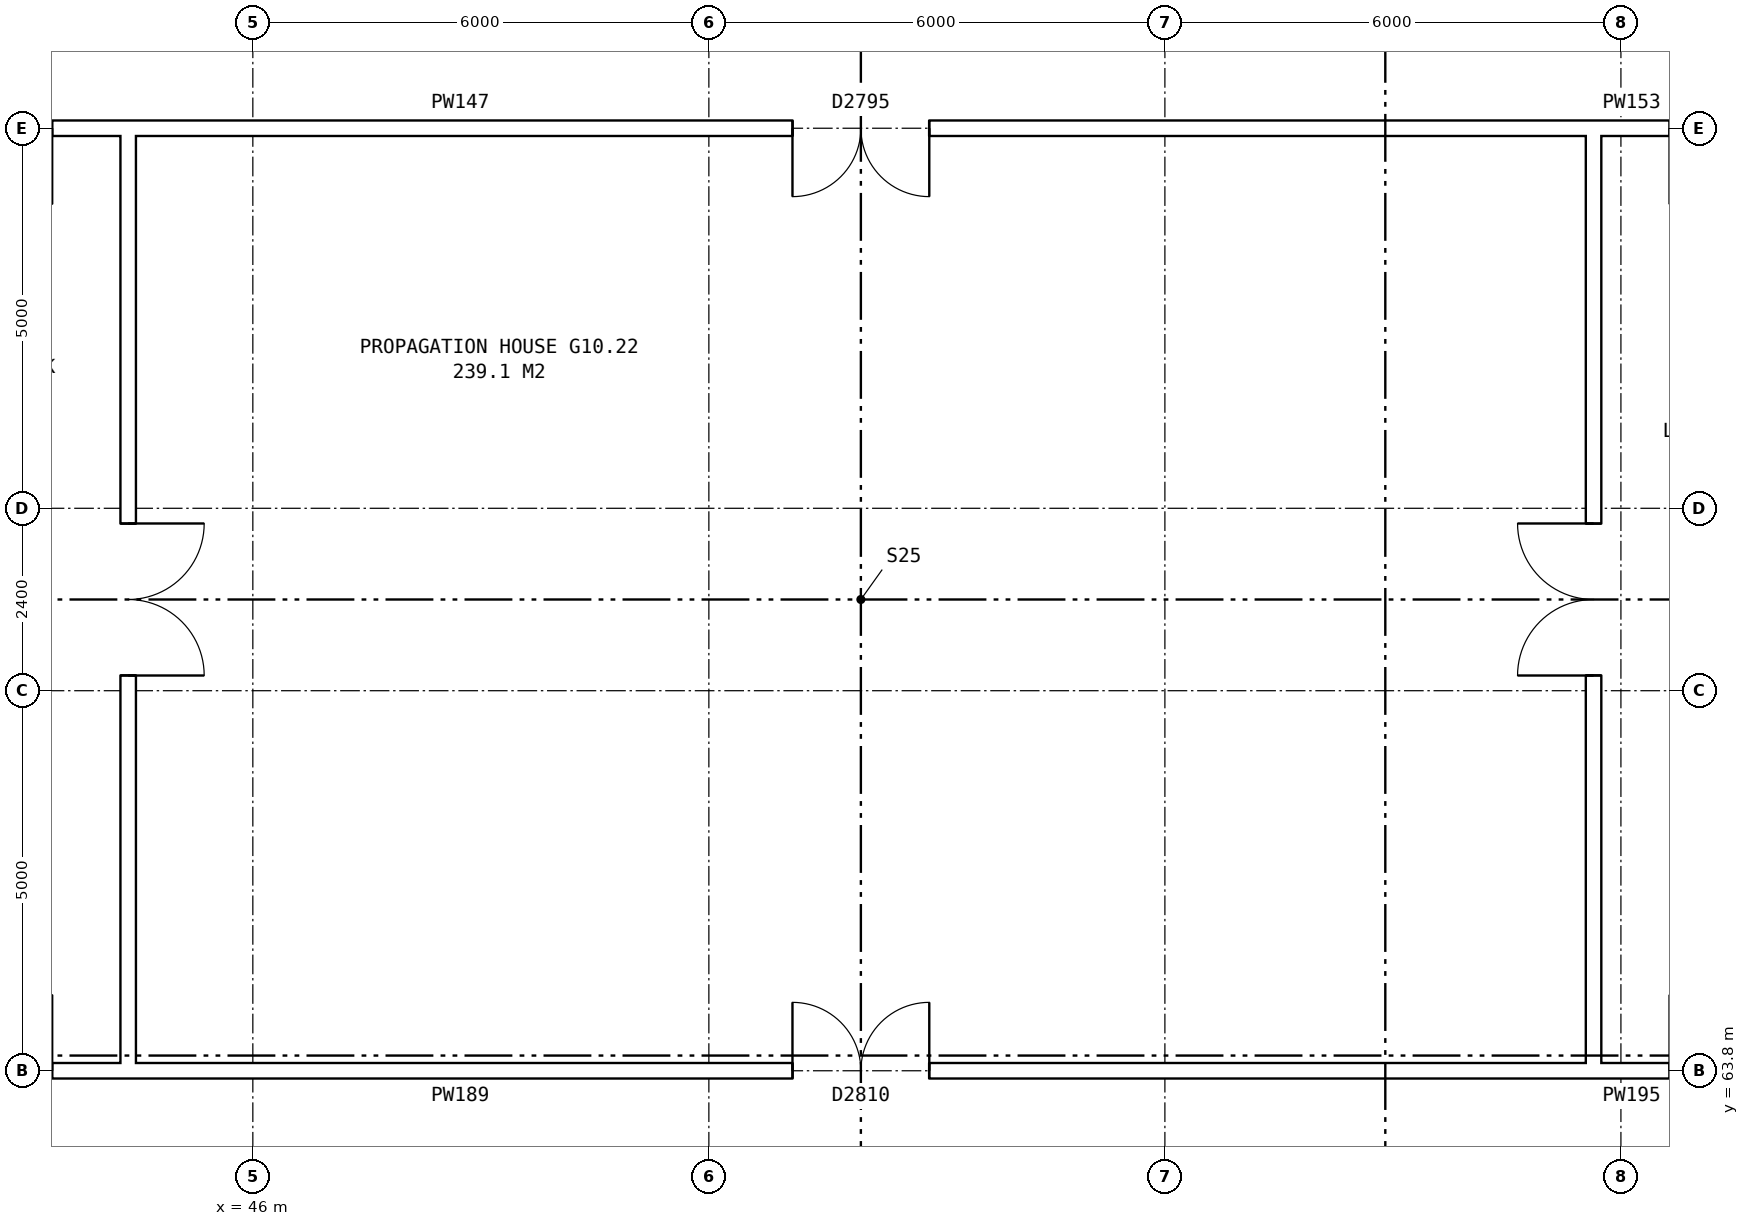
"""IFC4 building model, lengths in metres.
Left out: names, types, materials, properties, quantities, classifications, styles, units other than length and angle.
Written with IfcOpenShell. Run it as: python <this file> out.ifc"""

import sys

from ifc_helpers import new_model, si_unit, direction, frame, frame_2d, origin, place, context, subcontext, project, spatial, rectangle, extrude, element, fill, save


model = new_model("IFC4")
c1 = context("Model", 3, precision=1e-05, world=origin(), true_north=direction((0.0, 1.0)))
c2 = subcontext(c1, "Body", "Model", "MODEL_VIEW")
j1 = project(units=[si_unit("LENGTHUNIT", "METRE"), si_unit("PLANEANGLEUNIT", "RADIAN")], contexts=[c1])
p1 = place(None, origin())
s1 = spatial("IfcSite", under=j1, at=p1, CompositionType="ELEMENT")
p2 = place(p1, origin())
s2 = spatial("IfcBuilding", under=s1, at=p2, CompositionType="ELEMENT")
p3 = place(p2, frame((0.0, 0.0, 38.1)))
s3 = spatial("IfcBuildingStorey", under=s2, at=p3, CompositionType="ELEMENT", Elevation=38.1)
p4 = place(p3, frame((63.64, 63.9, 0.0), z_axis=(0.0, 0.0, 1.0), x_axis=(0.0, 1.0, 0.0)))
e1 = element("IfcWall", 1, at=p4, inside=s3, PredefinedType="PARTITIONING", context=c2, shape_type="SweptSolid", body=[
    extrude(rectangle(XDim=12.2, YDim=0.2, at=frame_2d((6.1, 0.0))), origin(), (0.0, 0.0, 1.0), 5.6),
])
p5 = place(p4, frame((5.1, 0.0, 0.0)))
e2 = element("IfcOpeningElement", 2, at=p5, cuts=e1, PredefinedType="OPENING", context=c2, shape_type="SweptSolid", body=[
    extrude(rectangle(XDim=2.0, YDim=2.1, at=frame_2d((1.0, 1.05))), frame((0.0, 0.11, 0.0), z_axis=(0.0, -1.0, 0.0), x_axis=(1.0, 0.0, 0.0)), (0.0, 0.0, 1.0), 0.22),
])
p6 = place(p3, frame((44.36, 63.9, 0.0), z_axis=(0.0, 0.0, 1.0), x_axis=(0.0, 1.0, 0.0)))
e3 = element("IfcWall", 3, at=p6, inside=s3, PredefinedType="PARTITIONING", context=c2, shape_type="SweptSolid", body=[
    extrude(rectangle(XDim=12.2, YDim=0.2, at=frame_2d((6.1, 0.0))), origin(), (0.0, 0.0, 1.0), 5.6),
])
p7 = place(p6, frame((5.1, 0.0, 0.0)))
e4 = element("IfcOpeningElement", 4, at=p7, cuts=e3, PredefinedType="OPENING", context=c2, shape_type="SweptSolid", body=[
    extrude(rectangle(XDim=2.0, YDim=2.1, at=frame_2d((1.0, 1.05))), frame((0.0, 0.11, 0.0), z_axis=(0.0, -1.0, 0.0), x_axis=(1.0, 0.0, 0.0)), (0.0, 0.0, 1.0), 0.22),
])
p8 = place(p3, frame((44.36, 63.8, 0.0), z_axis=(0.0, 0.0, 1.0), x_axis=(1.0, 0.0, 0.0)))
e5 = element("IfcWall", 5, at=p8, inside=s3, PredefinedType="PARTITIONING", context=c2, shape_type="SweptSolid", body=[
    extrude(rectangle(XDim=19.28, YDim=0.2, at=frame_2d((9.64, 0.0))), origin(), (0.0, 0.0, 1.0), 5.6),
])
p9 = place(p8, frame((8.74, 0.0, 0.0)))
e6 = element("IfcOpeningElement", 6, at=p9, cuts=e5, PredefinedType="OPENING", context=c2, shape_type="SweptSolid", body=[
    extrude(rectangle(XDim=1.8, YDim=2.1, at=frame_2d((0.9, 1.05))), frame((0.0, 0.11, 0.0), z_axis=(0.0, -1.0, 0.0), x_axis=(1.0, 0.0, 0.0)), (0.0, 0.0, 1.0), 0.22),
])
p10 = place(p3, frame((41.36, 63.8, 0.0), z_axis=(0.0, 0.0, 1.0), x_axis=(1.0, 0.0, 0.0)))
e7 = element("IfcWall", 7, at=p10, inside=s3, PredefinedType="PARTITIONING", context=c2, shape_type="SweptSolid", body=[
    extrude(rectangle(XDim=3.0, YDim=0.2, at=frame_2d((1.5, 0.0))), origin(), (0.0, 0.0, 1.0), 5.6),
])
p11 = place(p10, frame((1.0, 0.0, 0.0)))
e8 = element("IfcOpeningElement", 8, at=p11, cuts=e7, PredefinedType="OPENING", context=c2, shape_type="SweptSolid", body=[
    extrude(rectangle(XDim=1.0, YDim=2.1, at=frame_2d((0.5, 1.05))), frame((0.0, 0.11, 0.0), z_axis=(0.0, -1.0, 0.0), x_axis=(1.0, 0.0, 0.0)), (0.0, 0.0, 1.0), 0.22),
])
p12 = place(p3, frame((63.64, 63.8, 0.0), z_axis=(0.0, 0.0, 1.0), x_axis=(1.0, 0.0, 0.0)))
e9 = element("IfcWall", 9, at=p12, inside=s3, PredefinedType="PARTITIONING", context=c2, shape_type="SweptSolid", body=[
    extrude(rectangle(XDim=3.0, YDim=0.2, at=frame_2d((1.5, 0.0))), origin(), (0.0, 0.0, 1.0), 5.6),
])
p13 = place(p12, frame((1.0, 0.0, 0.0)))
e10 = element("IfcOpeningElement", 10, at=p13, cuts=e9, PredefinedType="OPENING", context=c2, shape_type="SweptSolid", body=[
    extrude(rectangle(XDim=1.0, YDim=2.1, at=frame_2d((0.5, 1.05))), frame((0.0, 0.11, 0.0), z_axis=(0.0, -1.0, 0.0), x_axis=(1.0, 0.0, 0.0)), (0.0, 0.0, 1.0), 0.22),
])
p14 = place(p3, frame((44.36, 76.2, 0.0), z_axis=(0.0, 0.0, 1.0), x_axis=(1.0, 0.0, 0.0)))
e11 = element("IfcWall", 11, at=p14, inside=s3, PredefinedType="PARTITIONING", context=c2, shape_type="SweptSolid", body=[
    extrude(rectangle(XDim=19.28, YDim=0.2, at=frame_2d((9.64, 0.0))), origin(), (0.0, 0.0, 1.0), 5.6),
])
p15 = place(p14, frame((8.74, 0.0, 0.0)))
e12 = element("IfcOpeningElement", 12, at=p15, cuts=e11, PredefinedType="OPENING", context=c2, shape_type="SweptSolid", body=[
    extrude(rectangle(XDim=1.8, YDim=2.1, at=frame_2d((0.9, 1.05))), frame((0.0, 0.11, 0.0), z_axis=(0.0, -1.0, 0.0), x_axis=(1.0, 0.0, 0.0)), (0.0, 0.0, 1.0), 0.22),
])
p16 = place(p3, frame((41.36, 76.2, 0.0), z_axis=(0.0, 0.0, 1.0), x_axis=(1.0, 0.0, 0.0)))
e13 = element("IfcWall", 13, at=p16, inside=s3, PredefinedType="PARTITIONING", context=c2, shape_type="SweptSolid", body=[
    extrude(rectangle(XDim=3.0, YDim=0.2, at=frame_2d((1.5, 0.0))), origin(), (0.0, 0.0, 1.0), 5.6),
])
p17 = place(p16, frame((1.0, 0.0, 0.0)))
e14 = element("IfcOpeningElement", 14, at=p17, cuts=e13, PredefinedType="OPENING", context=c2, shape_type="SweptSolid", body=[
    extrude(rectangle(XDim=1.0, YDim=2.1, at=frame_2d((0.5, 1.05))), frame((0.0, 0.11, 0.0), z_axis=(0.0, -1.0, 0.0), x_axis=(1.0, 0.0, 0.0)), (0.0, 0.0, 1.0), 0.22),
])
p18 = place(p3, frame((63.64, 76.2, 0.0), z_axis=(0.0, 0.0, 1.0), x_axis=(1.0, 0.0, 0.0)))
e15 = element("IfcWall", 15, at=p18, inside=s3, PredefinedType="PARTITIONING", context=c2, shape_type="SweptSolid", body=[
    extrude(rectangle(XDim=3.0, YDim=0.2, at=frame_2d((1.5, 0.0))), origin(), (0.0, 0.0, 1.0), 5.6),
])
p19 = place(p18, frame((1.0, 0.0, 0.0)))
e16 = element("IfcOpeningElement", 16, at=p19, cuts=e15, PredefinedType="OPENING", context=c2, shape_type="SweptSolid", body=[
    extrude(rectangle(XDim=1.0, YDim=2.1, at=frame_2d((0.5, 1.05))), frame((0.0, 0.11, 0.0), z_axis=(0.0, -1.0, 0.0), x_axis=(1.0, 0.0, 0.0)), (0.0, 0.0, 1.0), 0.22),
])
p20 = place(p5, origin())
e17 = element("IfcDoor", 17, at=p20, inside=s3, OperationType="DOUBLE_DOOR_SINGLE_SWING", PredefinedType="DOOR", context=c2, shape_type="SweptSolid", body=[
    extrude(rectangle(XDim=2.0, YDim=2.1, at=frame_2d((1.0, 1.05))), frame((0.0, 0.025, 0.0), z_axis=(0.0, -1.0, 0.0), x_axis=(1.0, 0.0, 0.0)), (0.0, 0.0, 1.0), 0.05),
])
fill(e2, e17)
p21 = place(p7, frame((2.0, 0.0, 0.0), z_axis=(0.0, 0.0, 1.0), x_axis=(-1.0, 0.0, 0.0)))
e18 = element("IfcDoor", 18, at=p21, inside=s3, OperationType="DOUBLE_DOOR_SINGLE_SWING", PredefinedType="DOOR", context=c2, shape_type="SweptSolid", body=[
    extrude(rectangle(XDim=2.0, YDim=2.1, at=frame_2d((1.0, 1.05))), frame((0.0, 0.025, 0.0), z_axis=(0.0, -1.0, 0.0), x_axis=(1.0, 0.0, 0.0)), (0.0, 0.0, 1.0), 0.05),
])
fill(e4, e18)
p22 = place(p9, origin())
e19 = element("IfcDoor", 19, at=p22, inside=s3, OperationType="DOUBLE_DOOR_SINGLE_SWING", PredefinedType="DOOR", context=c2, shape_type="SweptSolid", body=[
    extrude(rectangle(XDim=1.8, YDim=2.1, at=frame_2d((0.9, 1.05))), frame((0.0, 0.025, 0.0), z_axis=(0.0, -1.0, 0.0), x_axis=(1.0, 0.0, 0.0)), (0.0, 0.0, 1.0), 0.05),
])
fill(e6, e19)
p23 = place(p15, frame((1.8, 0.0, 0.0), z_axis=(0.0, 0.0, 1.0), x_axis=(-1.0, 0.0, 0.0)))
e20 = element("IfcDoor", 20, at=p23, inside=s3, OperationType="DOUBLE_DOOR_SINGLE_SWING", PredefinedType="DOOR", context=c2, shape_type="SweptSolid", body=[
    extrude(rectangle(XDim=1.8, YDim=2.1, at=frame_2d((0.9, 1.05))), frame((0.0, 0.025, 0.0), z_axis=(0.0, -1.0, 0.0), x_axis=(1.0, 0.0, 0.0)), (0.0, 0.0, 1.0), 0.05),
])
fill(e12, e20)
save(model, sys.argv[1])
